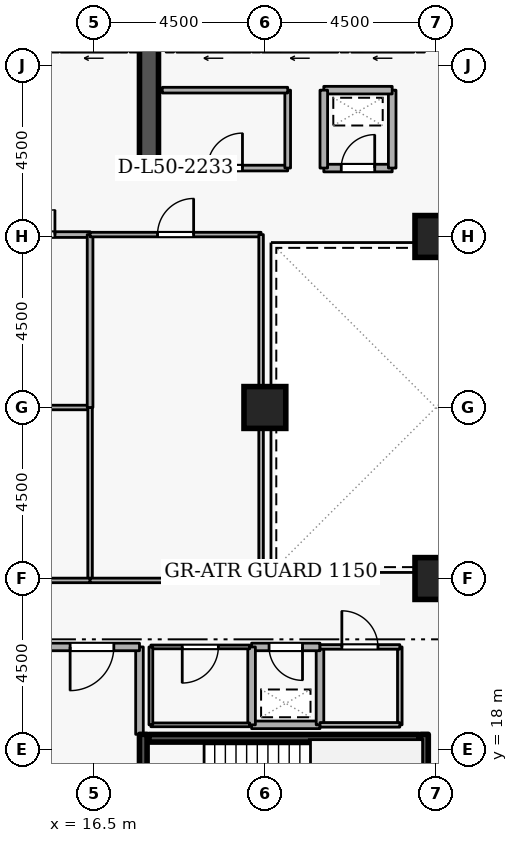
"""IFC4 building model, lengths in metres.
Left out: names, types, materials, properties, quantities, classifications, styles, units other than length and angle.
Written with IfcOpenShell. Run it as: python <this file> out.ifc"""

import sys

from ifc_helpers import new_model, si_unit, direction, frame, frame_2d, origin, origin_2d, place, context, subcontext, project, spatial, rectangle, extrude, element, fill, save


model = new_model("IFC4")
c1 = context("Model", 3, precision=1e-05, world=origin(), true_north=direction((0.0, 1.0)))
c2 = subcontext(c1, "Body", "Model", "MODEL_VIEW")
j1 = project(units=[si_unit("LENGTHUNIT", "METRE"), si_unit("PLANEANGLEUNIT", "RADIAN")], contexts=[c1])
p1 = place(None, origin())
s1 = spatial("IfcSite", under=j1, at=p1, CompositionType="ELEMENT")
p2 = place(p1, origin())
s2 = spatial("IfcBuilding", under=s1, at=p2, CompositionType="ELEMENT")
p3 = place(p2, frame((0.0, 0.0, 189.3)))
s3 = spatial("IfcBuildingStorey", under=s2, at=p3, CompositionType="ELEMENT", Elevation=189.3)
p4 = place(p3, frame((17.95, 33.1, 0.0), z_axis=(0.0, 0.0, 1.0), x_axis=(0.0, 1.0, 0.0)))
e1 = element("IfcWall", 1, at=p4, inside=s3, PredefinedType="SHEAR", context=c2, shape_type="SweptSolid", body=[
    extrude(rectangle(XDim=5.8, YDim=0.5, at=frame_2d((2.9, 0.0))), origin(), (0.0, 0.0, 1.0), 3.6),
])
for number, where, z_axis, x_axis in (
    (2, (25.5, 22.5, 0.0), (0.0, 0.0, 1.0), (1.0, 0.0, 0.0)),
    (3, (25.5, 31.5, 0.0), (0.0, 0.0, 1.0), (1.0, 0.0, 0.0)),
    (4, (21.0, 27.0, 0.0), (0.0, 0.0, 1.0), (1.0, 0.0, 0.0)),
):
    element("IfcColumn", number, at=place(p3, frame(where, z_axis=z_axis, x_axis=x_axis)), inside=s3, PredefinedType="COLUMN", context=c2, shape_type="SweptSolid", body=[
        extrude(rectangle(XDim=1.1, YDim=1.1, at=origin_2d()), origin(), (0.0, 0.0, 1.0), 3.6),
    ])
p5 = place(p3, frame((24.92, 36.45, 0.0), z_axis=(0.0, 0.0, 1.0), x_axis=(-1.0, 0.0, 0.0)))
e5 = element("IfcWall", 5, at=p5, inside=s3, PredefinedType="STANDARD", context=c2, shape_type="SweptSolid", body=[
    extrude(rectangle(XDim=1.64, YDim=0.2, at=frame_2d((0.82, 0.0))), origin(), (0.0, 0.0, 1.0), 3.34),
])
p6 = place(p5, frame((0.31, 0.0, 0.0)))
e6 = element("IfcOpeningElement", 6, at=p6, cuts=e5, PredefinedType="OPENING", context=c2, shape_type="SweptSolid", body=[
    extrude(rectangle(XDim=1.02, YDim=2.06, at=frame_2d((0.51, 1.03))), frame((0.0, 0.11, 0.0), z_axis=(0.0, -1.0, 0.0), x_axis=(1.0, 0.0, 0.0)), (0.0, 0.0, 1.0), 0.22),
])
p7 = place(p3, frame((22.92, 36.45, 0.0), z_axis=(0.0, 0.0, 1.0), x_axis=(-1.0, 0.0, 0.0)))
e7 = element("IfcWall", 7, at=p7, inside=s3, PredefinedType="STANDARD", context=c2, shape_type="SweptSolid", body=[
    extrude(rectangle(XDim=1.99, YDim=0.2, at=frame_2d((0.995, 0.0))), origin(), (0.0, 0.0, 1.0), 3.34),
])
p8 = place(p7, frame((0.485, 0.0, 0.0)))
e8 = element("IfcOpeningElement", 8, at=p8, cuts=e7, PredefinedType="OPENING", context=c2, shape_type="SweptSolid", body=[
    extrude(rectangle(XDim=1.02, YDim=2.06, at=frame_2d((0.51, 1.03))), frame((0.0, 0.11, 0.0), z_axis=(0.0, -1.0, 0.0), x_axis=(1.0, 0.0, 0.0)), (0.0, 0.0, 1.0), 0.22),
])
p9 = place(p3, frame((20.62, 36.45, 0.0), z_axis=(0.0, 0.0, 1.0), x_axis=(-1.0, 0.0, 0.0)))
e9 = element("IfcWall", 9, at=p9, inside=s3, PredefinedType="STANDARD", context=c2, shape_type="SweptSolid", body=[
    extrude(rectangle(XDim=1.94, YDim=0.2, at=frame_2d((0.97, 0.0))), origin(), (0.0, 0.0, 1.0), 3.34),
])
p10 = place(p9, frame((0.46, 0.0, 0.0)))
e10 = element("IfcOpeningElement", 10, at=p10, cuts=e9, PredefinedType="OPENING", context=c2, shape_type="SweptSolid", body=[
    extrude(rectangle(XDim=1.02, YDim=2.06, at=frame_2d((0.51, 1.03))), frame((0.0, 0.11, 0.0), z_axis=(0.0, -1.0, 0.0), x_axis=(1.0, 0.0, 0.0)), (0.0, 0.0, 1.0), 0.22),
])
p11 = place(p3, frame((17.37, 36.45, 0.0), z_axis=(0.0, 0.0, 1.0), x_axis=(-1.0, 0.0, 0.0)))
e11 = element("IfcWall", 11, at=p11, inside=s3, PredefinedType="STANDARD", context=c2, shape_type="SweptSolid", body=[
    extrude(rectangle(XDim=1.74, YDim=0.2, at=frame_2d((0.87, 0.0))), origin(), (0.0, 0.0, 1.0), 3.34),
])
p12 = place(p11, frame((0.36, 0.0, 0.0)))
e12 = element("IfcOpeningElement", 12, at=p12, cuts=e11, PredefinedType="OPENING", context=c2, shape_type="SweptSolid", body=[
    extrude(rectangle(XDim=1.02, YDim=2.06, at=frame_2d((0.51, 1.03))), frame((0.0, 0.11, 0.0), z_axis=(0.0, -1.0, 0.0), x_axis=(1.0, 0.0, 0.0)), (0.0, 0.0, 1.0), 0.22),
])
p13 = place(p3, frame((17.8, 15.05, 0.0), z_axis=(0.0, 0.0, 1.0), x_axis=(0.0, 1.0, 0.0)))
e13 = element("IfcWall", 13, at=p13, inside=s3, PredefinedType="SHEAR", context=c2, shape_type="SweptSolid", body=[
    extrude(rectangle(XDim=3.35, YDim=0.2, at=frame_2d((1.675, 0.0))), origin(), (0.0, 0.0, 1.0), 3.6),
])
p14 = place(p13, frame((1.125, 0.0, 0.0)))
e14 = element("IfcOpeningElement", 14, at=p14, cuts=e13, PredefinedType="OPENING", context=c2, shape_type="SweptSolid", body=[
    extrude(rectangle(XDim=1.1, YDim=2.1, at=frame_2d((0.55, 1.05))), frame((0.0, 0.11, 0.0), z_axis=(0.0, -1.0, 0.0), x_axis=(1.0, 0.0, 0.0)), (0.0, 0.0, 1.0), 0.22),
])
p15 = place(p3, frame((25.2, 18.4, 0.0), z_axis=(0.0, 0.0, 1.0), x_axis=(0.0, -1.0, 0.0)))
e15 = element("IfcWall", 15, at=p15, inside=s3, PredefinedType="SHEAR", context=c2, shape_type="SweptSolid", body=[
    extrude(rectangle(XDim=3.35, YDim=0.2, at=frame_2d((1.675, 0.0))), origin(), (0.0, 0.0, 1.0), 3.6),
])
p16 = place(p3, frame((25.05, 18.297, 0.0), z_axis=(0.0, 0.0, 1.0), x_axis=(-1.0, 0.0, 0.0)))
e16 = element("IfcWall", 16, at=p16, inside=s3, PredefinedType="SHEAR", context=c2, shape_type="SweptSolid", body=[
    extrude(rectangle(XDim=7.1, YDim=0.2, at=frame_2d((3.55, 0.0))), origin(), (0.0, 0.0, 1.0), 3.6),
])
p17 = place(p3, frame((17.7, 18.4, 0.0), z_axis=(0.0, 0.0, 1.0), x_axis=(0.0, 1.0, 0.0)))
e17 = element("IfcWall", 17, at=p17, inside=s3, PredefinedType="STANDARD", context=c2, shape_type="SweptSolid", body=[
    extrude(rectangle(XDim=2.3, YDim=0.2, at=frame_2d((1.15, 0.0))), origin(), (0.0, 0.0, 1.0), 2.545),
])
p18 = place(p3, frame((17.7, 20.7, 0.0), z_axis=(0.0, 0.0, 1.0), x_axis=(-1.0, 0.0, 0.0)))
e18 = element("IfcWall", 18, at=p18, inside=s3, PredefinedType="STANDARD", context=c2, shape_type="SweptSolid", body=[
    extrude(rectangle(XDim=2.5, YDim=0.2, at=frame_2d((1.25, 0.0))), origin(), (0.0, 0.0, 1.0), 3.34),
])
p19 = place(p18, frame((0.675, 0.0, 0.0)))
e19 = element("IfcOpeningElement", 19, at=p19, cuts=e18, PredefinedType="OPENING", context=c2, shape_type="SweptSolid", body=[
    extrude(rectangle(XDim=1.15, YDim=2.1, at=frame_2d((0.575, 1.05))), frame((0.0, 0.11, 0.0), z_axis=(0.0, -1.0, 0.0), x_axis=(1.0, 0.0, 0.0)), (0.0, 0.0, 1.0), 0.22),
])
p20 = place(p3, frame((20.65, 18.65, 0.0), z_axis=(0.0, 0.0, 1.0), x_axis=(1.0, 0.0, 0.0)))
e20 = element("IfcWall", 20, at=p20, inside=s3, PredefinedType="STANDARD", context=c2, shape_type="SweptSolid", body=[
    extrude(rectangle(XDim=1.8, YDim=0.2, at=frame_2d((0.9, 0.0))), origin(), (0.0, 0.0, 1.0), 3.34),
])
p21 = place(p3, frame((22.45, 18.65, 0.0), z_axis=(0.0, 0.0, 1.0), x_axis=(0.0, 1.0, 0.0)))
e21 = element("IfcWall", 21, at=p21, inside=s3, PredefinedType="STANDARD", context=c2, shape_type="SweptSolid", body=[
    extrude(rectangle(XDim=2.05, YDim=0.2, at=frame_2d((1.025, 0.0))), origin(), (0.0, 0.0, 1.0), 3.34),
])
p22 = place(p3, frame((22.45, 20.7, 0.0), z_axis=(0.0, 0.0, 1.0), x_axis=(-1.0, 0.0, 0.0)))
e22 = element("IfcWall", 22, at=p22, inside=s3, PredefinedType="STANDARD", context=c2, shape_type="SweptSolid", body=[
    extrude(rectangle(XDim=1.8, YDim=0.2, at=frame_2d((0.9, 0.0))), origin(), (0.0, 0.0, 1.0), 3.34),
])
p23 = place(p22, frame((0.46, 0.0, 0.0)))
e23 = element("IfcOpeningElement", 23, at=p23, cuts=e22, PredefinedType="OPENING", context=c2, shape_type="SweptSolid", body=[
    extrude(rectangle(XDim=0.88, YDim=2.04, at=frame_2d((0.44, 1.02))), frame((0.0, 0.11, 0.0), z_axis=(0.0, -1.0, 0.0), x_axis=(1.0, 0.0, 0.0)), (0.0, 0.0, 1.0), 0.22),
])
p24 = place(p3, frame((20.65, 20.7, 0.0), z_axis=(0.0, 0.0, 1.0), x_axis=(0.0, -1.0, 0.0)))
e24 = element("IfcWall", 24, at=p24, inside=s3, PredefinedType="STANDARD", context=c2, shape_type="SweptSolid", body=[
    extrude(rectangle(XDim=2.05, YDim=0.2, at=frame_2d((1.025, 0.0))), origin(), (0.0, 0.0, 1.0), 3.34),
])
p25 = place(p3, frame((22.55, 33.3, 0.0), z_axis=(0.0, 0.0, 1.0), x_axis=(1.0, 0.0, 0.0)))
e25 = element("IfcWall", 25, at=p25, inside=s3, PredefinedType="STANDARD", context=c2, shape_type="SweptSolid", body=[
    extrude(rectangle(XDim=1.8, YDim=0.2, at=frame_2d((0.9, 0.0))), origin(), (0.0, 0.0, 1.0), 3.34),
])
p26 = place(p25, frame((0.46, 0.0, 0.0)))
e26 = element("IfcOpeningElement", 26, at=p26, cuts=e25, PredefinedType="OPENING", context=c2, shape_type="SweptSolid", body=[
    extrude(rectangle(XDim=0.88, YDim=2.04, at=frame_2d((0.44, 1.02))), frame((0.0, 0.11, 0.0), z_axis=(0.0, -1.0, 0.0), x_axis=(1.0, 0.0, 0.0)), (0.0, 0.0, 1.0), 0.22),
])
p27 = place(p3, frame((24.35, 33.3, 0.0), z_axis=(0.0, 0.0, 1.0), x_axis=(0.0, 1.0, 0.0)))
e27 = element("IfcWall", 27, at=p27, inside=s3, PredefinedType="STANDARD", context=c2, shape_type="SweptSolid", body=[
    extrude(rectangle(XDim=2.05, YDim=0.2, at=frame_2d((1.025, 0.0))), origin(), (0.0, 0.0, 1.0), 3.34),
])
p28 = place(p3, frame((24.35, 35.35, 0.0), z_axis=(0.0, 0.0, 1.0), x_axis=(-1.0, 0.0, 0.0)))
e28 = element("IfcWall", 28, at=p28, inside=s3, PredefinedType="STANDARD", context=c2, shape_type="SweptSolid", body=[
    extrude(rectangle(XDim=1.8, YDim=0.2, at=frame_2d((0.9, 0.0))), origin(), (0.0, 0.0, 1.0), 3.34),
])
p29 = place(p3, frame((22.55, 35.35, 0.0), z_axis=(0.0, 0.0, 1.0), x_axis=(0.0, -1.0, 0.0)))
e29 = element("IfcWall", 29, at=p29, inside=s3, PredefinedType="STANDARD", context=c2, shape_type="SweptSolid", body=[
    extrude(rectangle(XDim=2.05, YDim=0.2, at=frame_2d((1.025, 0.0))), origin(), (0.0, 0.0, 1.0), 3.34),
])
p30 = place(p3, frame((18.0, 18.65, 0.0), z_axis=(0.0, 0.0, 1.0), x_axis=(1.0, 0.0, 0.0)))
e30 = element("IfcWall", 30, at=p30, inside=s3, PredefinedType="PARTITIONING", context=c2, shape_type="SweptSolid", body=[
    extrude(rectangle(XDim=2.6, YDim=0.1, at=frame_2d((1.3, 0.0))), origin(), (0.0, 0.0, 1.0), 3.34),
])
p31 = place(p3, frame((20.6, 20.7, 0.0), z_axis=(0.0, 0.0, 1.0), x_axis=(-1.0, 0.0, 0.0)))
e31 = element("IfcWall", 31, at=p31, inside=s3, PredefinedType="PARTITIONING", context=c2, shape_type="SweptSolid", body=[
    extrude(rectangle(XDim=2.6, YDim=0.1, at=frame_2d((1.3, 0.0))), origin(), (0.0, 0.0, 1.0), 3.34),
])
p32 = place(p31, frame((0.825, 0.0, 0.0)))
e32 = element("IfcOpeningElement", 32, at=p32, cuts=e31, PredefinedType="OPENING", context=c2, shape_type="SweptSolid", body=[
    extrude(rectangle(XDim=0.95, YDim=2.1, at=frame_2d((0.475, 1.05))), frame((0.0, 0.06, 0.0), z_axis=(0.0, -1.0, 0.0), x_axis=(1.0, 0.0, 0.0)), (0.0, 0.0, 1.0), 0.12),
])
p33 = place(p3, frame((18.0, 20.7, 0.0), z_axis=(0.0, 0.0, 1.0), x_axis=(0.0, -1.0, 0.0)))
e33 = element("IfcWall", 33, at=p33, inside=s3, PredefinedType="PARTITIONING", context=c2, shape_type="SweptSolid", body=[
    extrude(rectangle(XDim=2.05, YDim=0.1, at=frame_2d((1.025, 0.0))), origin(), (0.0, 0.0, 1.0), 2.545),
])
p34 = place(p3, frame((24.55, 20.7, 0.0), z_axis=(0.0, 0.0, 1.0), x_axis=(0.0, -1.0, 0.0)))
e34 = element("IfcWall", 34, at=p34, inside=s3, PredefinedType="PARTITIONING", context=c2, shape_type="SweptSolid", body=[
    extrude(rectangle(XDim=2.05, YDim=0.12, at=frame_2d((1.025, 0.0))), origin(), (0.0, 0.0, 1.0), 3.34),
])
p35 = place(p3, frame((24.55, 18.65, 0.0), z_axis=(0.0, 0.0, 1.0), x_axis=(-1.0, 0.0, 0.0)))
e35 = element("IfcWall", 35, at=p35, inside=s3, PredefinedType="PARTITIONING", context=c2, shape_type="SweptSolid", body=[
    extrude(rectangle(XDim=2.1, YDim=0.12, at=frame_2d((1.05, 0.0))), origin(), (0.0, 0.0, 1.0), 3.34),
])
p36 = place(p3, frame((22.45, 20.7, 0.0), z_axis=(0.0, 0.0, 1.0), x_axis=(1.0, 0.0, 0.0)))
e36 = element("IfcWall", 36, at=p36, inside=s3, PredefinedType="PARTITIONING", context=c2, shape_type="SweptSolid", body=[
    extrude(rectangle(XDim=2.1, YDim=0.12, at=frame_2d((1.05, 0.0))), origin(), (0.0, 0.0, 1.0), 3.34),
])
p37 = place(p36, frame((0.575, 0.0, 0.0)))
e37 = element("IfcOpeningElement", 37, at=p37, cuts=e36, PredefinedType="OPENING", context=c2, shape_type="SweptSolid", body=[
    extrude(rectangle(XDim=0.95, YDim=2.1, at=frame_2d((0.475, 1.05))), frame((0.0, 0.07, 0.0), z_axis=(0.0, -1.0, 0.0), x_axis=(1.0, 0.0, 0.0)), (0.0, 0.0, 1.0), 0.14),
])
p38 = place(p3, frame((18.3, 33.3, 0.0), z_axis=(0.0, 0.0, 1.0), x_axis=(1.0, 0.0, 0.0)))
e38 = element("IfcWall", 38, at=p38, inside=s3, PredefinedType="PARTITIONING", context=c2, shape_type="SweptSolid", body=[
    extrude(rectangle(XDim=3.3, YDim=0.15, at=frame_2d((1.65, 0.0))), origin(), (0.0, 0.0, 1.0), 3.34),
])
p39 = place(p38, frame((1.19, 0.0, 0.0)))
e39 = element("IfcOpeningElement", 39, at=p39, cuts=e38, PredefinedType="OPENING", context=c2, shape_type="SweptSolid", body=[
    extrude(rectangle(XDim=0.92, YDim=2.08, at=frame_2d((0.46, 1.04))), frame((0.0, 0.085, 0.0), z_axis=(0.0, -1.0, 0.0), x_axis=(1.0, 0.0, 0.0)), (0.0, 0.0, 1.0), 0.17),
])
p40 = place(p3, frame((21.6, 33.3, 0.0), z_axis=(0.0, 0.0, 1.0), x_axis=(0.0, 1.0, 0.0)))
e40 = element("IfcWall", 40, at=p40, inside=s3, PredefinedType="PARTITIONING", context=c2, shape_type="SweptSolid", body=[
    extrude(rectangle(XDim=2.05, YDim=0.15, at=frame_2d((1.025, 0.0))), origin(), (0.0, 0.0, 1.0), 3.34),
])
p41 = place(p3, frame((21.6, 35.35, 0.0), z_axis=(0.0, 0.0, 1.0), x_axis=(-1.0, 0.0, 0.0)))
e41 = element("IfcWall", 41, at=p41, inside=s3, PredefinedType="PARTITIONING", context=c2, shape_type="SweptSolid", body=[
    extrude(rectangle(XDim=3.3, YDim=0.15, at=frame_2d((1.65, 0.0))), origin(), (0.0, 0.0, 1.0), 3.34),
])
p42 = place(p3, frame((7.78, 27.0, 0.0), z_axis=(0.0, 0.0, 1.0), x_axis=(1.0, 0.0, 0.0)))
e42 = element("IfcWall", 42, at=p42, inside=s3, PredefinedType="PARTITIONING", context=c2, shape_type="SweptSolid", body=[
    extrude(rectangle(XDim=8.62, YDim=0.12, at=frame_2d((4.31, 0.0))), origin(), (0.0, 0.0, 1.0), 2.878),
])
p43 = place(p3, frame((16.4, 27.0, 0.0), z_axis=(0.0, 0.0, 1.0), x_axis=(0.0, -1.0, 0.0)))
e43 = element("IfcWall", 43, at=p43, inside=s3, PredefinedType="PARTITIONING", context=c2, shape_type="SweptSolid", body=[
    extrude(rectangle(XDim=4.55, YDim=0.12, at=frame_2d((2.275, 0.0))), origin(), (0.0, 0.0, 1.0), 3.34),
])
p44 = place(p3, frame((16.4, 22.45, 0.0), z_axis=(0.0, 0.0, 1.0), x_axis=(-1.0, 0.0, 0.0)))
e44 = element("IfcWall", 44, at=p44, inside=s3, PredefinedType="PARTITIONING", context=c2, shape_type="SweptSolid", body=[
    extrude(rectangle(XDim=1.2, YDim=0.12, at=frame_2d((0.6, 0.0))), origin(), (0.0, 0.0, 1.0), 3.34),
])
p45 = place(p3, frame((13.25, 31.55, 0.0), z_axis=(0.0, 0.0, 1.0), x_axis=(1.0, 0.0, 0.0)))
e45 = element("IfcWall", 45, at=p45, inside=s3, PredefinedType="PARTITIONING", context=c2, shape_type="SweptSolid", body=[
    extrude(rectangle(XDim=3.15, YDim=0.15, at=frame_2d((1.575, 0.0))), origin(), (0.0, 0.0, 1.0), 3.34),
])
p46 = place(p45, frame((0.925, 0.0, 0.0)))
e46 = element("IfcOpeningElement", 46, at=p46, cuts=e45, PredefinedType="OPENING", context=c2, shape_type="SweptSolid", body=[
    extrude(rectangle(XDim=1.3, YDim=2.12, at=frame_2d((0.65, 1.06))), frame((0.0, 0.085, 0.0), z_axis=(0.0, -1.0, 0.0), x_axis=(1.0, 0.0, 0.0)), (0.0, 0.0, 1.0), 0.17),
])
p47 = place(p3, frame((16.4, 31.55, 0.0), z_axis=(0.0, 0.0, 1.0), x_axis=(0.0, -1.0, 0.0)))
e47 = element("IfcWall", 47, at=p47, inside=s3, PredefinedType="PARTITIONING", context=c2, shape_type="SweptSolid", body=[
    extrude(rectangle(XDim=4.55, YDim=0.15, at=frame_2d((2.275, 0.0))), origin(), (0.0, 0.0, 1.0), 3.34),
])
p48 = place(p3, frame((16.4, 31.55, 0.0), z_axis=(0.0, 0.0, 1.0), x_axis=(1.0, 0.0, 0.0)))
e48 = element("IfcWall", 48, at=p48, inside=s3, PredefinedType="PARTITIONING", context=c2, shape_type="SweptSolid", body=[
    extrude(rectangle(XDim=4.5, YDim=0.12, at=frame_2d((2.25, 0.0))), origin(), (0.0, 0.0, 1.0), 3.34),
])
p49 = place(p48, frame((1.775, 0.0, 0.0)))
e49 = element("IfcOpeningElement", 49, at=p49, cuts=e48, PredefinedType="OPENING", context=c2, shape_type="SweptSolid", body=[
    extrude(rectangle(XDim=0.95, YDim=2.1, at=frame_2d((0.475, 1.05))), frame((0.0, 0.07, 0.0), z_axis=(0.0, -1.0, 0.0), x_axis=(1.0, 0.0, 0.0)), (0.0, 0.0, 1.0), 0.14),
])
p50 = place(p3, frame((20.9, 31.55, 0.0), z_axis=(0.0, 0.0, 1.0), x_axis=(0.0, -1.0, 0.0)))
e50 = element("IfcWall", 50, at=p50, inside=s3, PredefinedType="PARTITIONING", context=c2, shape_type="SweptSolid", body=[
    extrude(rectangle(XDim=9.1, YDim=0.12, at=frame_2d((4.55, 0.0))), origin(), (0.0, 0.0, 1.0), 3.34),
])
p51 = place(p3, frame((20.9, 22.45, 0.0), z_axis=(0.0, 0.0, 1.0), x_axis=(-1.0, 0.0, 0.0)))
e51 = element("IfcWall", 51, at=p51, inside=s3, PredefinedType="PARTITIONING", context=c2, shape_type="SweptSolid", body=[
    extrude(rectangle(XDim=4.5, YDim=0.12, at=frame_2d((2.25, 0.0))), origin(), (0.0, 0.0, 1.0), 3.34),
])
p52 = place(p19, origin())
e52 = element("IfcDoor", 52, at=p52, inside=s3, OperationType="SINGLE_SWING_RIGHT", PredefinedType="DOOR", context=c2, shape_type="SweptSolid", body=[
    extrude(rectangle(XDim=1.15, YDim=2.1, at=frame_2d((0.575, 1.05))), frame((0.0, 0.025, 0.0), z_axis=(0.0, -1.0, 0.0), x_axis=(1.0, 0.0, 0.0)), (0.0, 0.0, 1.0), 0.05),
])
fill(e19, e52)
p53 = place(p23, origin())
e53 = element("IfcDoor", 53, at=p53, inside=s3, OperationType="SINGLE_SWING_LEFT", PredefinedType="DOOR", context=c2, shape_type="SweptSolid", body=[
    extrude(rectangle(XDim=0.88, YDim=2.04, at=frame_2d((0.44, 1.02))), frame((0.0, 0.025, 0.0), z_axis=(0.0, -1.0, 0.0), x_axis=(1.0, 0.0, 0.0)), (0.0, 0.0, 1.0), 0.05),
])
fill(e23, e53)
p54 = place(p26, origin())
e54 = element("IfcDoor", 54, at=p54, inside=s3, OperationType="SINGLE_SWING_RIGHT", PredefinedType="DOOR", context=c2, shape_type="SweptSolid", body=[
    extrude(rectangle(XDim=0.88, YDim=2.04, at=frame_2d((0.44, 1.02))), frame((0.0, 0.025, 0.0), z_axis=(0.0, -1.0, 0.0), x_axis=(1.0, 0.0, 0.0)), (0.0, 0.0, 1.0), 0.05),
])
fill(e26, e54)
p55 = place(p32, origin())
e55 = element("IfcDoor", 55, at=p55, inside=s3, OperationType="SINGLE_SWING_RIGHT", PredefinedType="DOOR", context=c2, shape_type="SweptSolid", body=[
    extrude(rectangle(XDim=0.95, YDim=2.1, at=frame_2d((0.475, 1.05))), frame((0.0, 0.025, 0.0), z_axis=(0.0, -1.0, 0.0), x_axis=(1.0, 0.0, 0.0)), (0.0, 0.0, 1.0), 0.05),
])
fill(e32, e55)
p56 = place(p37, origin())
e56 = element("IfcDoor", 56, at=p56, inside=s3, OperationType="SINGLE_SWING_LEFT", PredefinedType="DOOR", context=c2, shape_type="SweptSolid", body=[
    extrude(rectangle(XDim=0.95, YDim=2.1, at=frame_2d((0.475, 1.05))), frame((0.0, 0.025, 0.0), z_axis=(0.0, -1.0, 0.0), x_axis=(1.0, 0.0, 0.0)), (0.0, 0.0, 1.0), 0.05),
])
fill(e37, e56)
p57 = place(p39, origin())
e57 = element("IfcDoor", 57, at=p57, inside=s3, OperationType="SINGLE_SWING_RIGHT", PredefinedType="DOOR", context=c2, shape_type="SweptSolid", body=[
    extrude(rectangle(XDim=0.92, YDim=2.08, at=frame_2d((0.46, 1.04))), frame((0.0, 0.025, 0.0), z_axis=(0.0, -1.0, 0.0), x_axis=(1.0, 0.0, 0.0)), (0.0, 0.0, 1.0), 0.05),
])
fill(e39, e57)
p58 = place(p46, origin())
e58 = element("IfcDoor", 58, at=p58, inside=s3, OperationType="DOUBLE_DOOR_SINGLE_SWING", PredefinedType="DOOR", context=c2, shape_type="SweptSolid", body=[
    extrude(rectangle(XDim=1.3, YDim=2.12, at=frame_2d((0.65, 1.06))), frame((0.0, 0.025, 0.0), z_axis=(0.0, -1.0, 0.0), x_axis=(1.0, 0.0, 0.0)), (0.0, 0.0, 1.0), 0.05),
])
fill(e46, e58)
p59 = place(p49, origin())
e59 = element("IfcDoor", 59, at=p59, inside=s3, OperationType="SINGLE_SWING_RIGHT", PredefinedType="DOOR", context=c2, shape_type="SweptSolid", body=[
    extrude(rectangle(XDim=0.95, YDim=2.1, at=frame_2d((0.475, 1.05))), frame((0.0, 0.025, 0.0), z_axis=(0.0, -1.0, 0.0), x_axis=(1.0, 0.0, 0.0)), (0.0, 0.0, 1.0), 0.05),
])
fill(e49, e59)
save(model, sys.argv[1])
